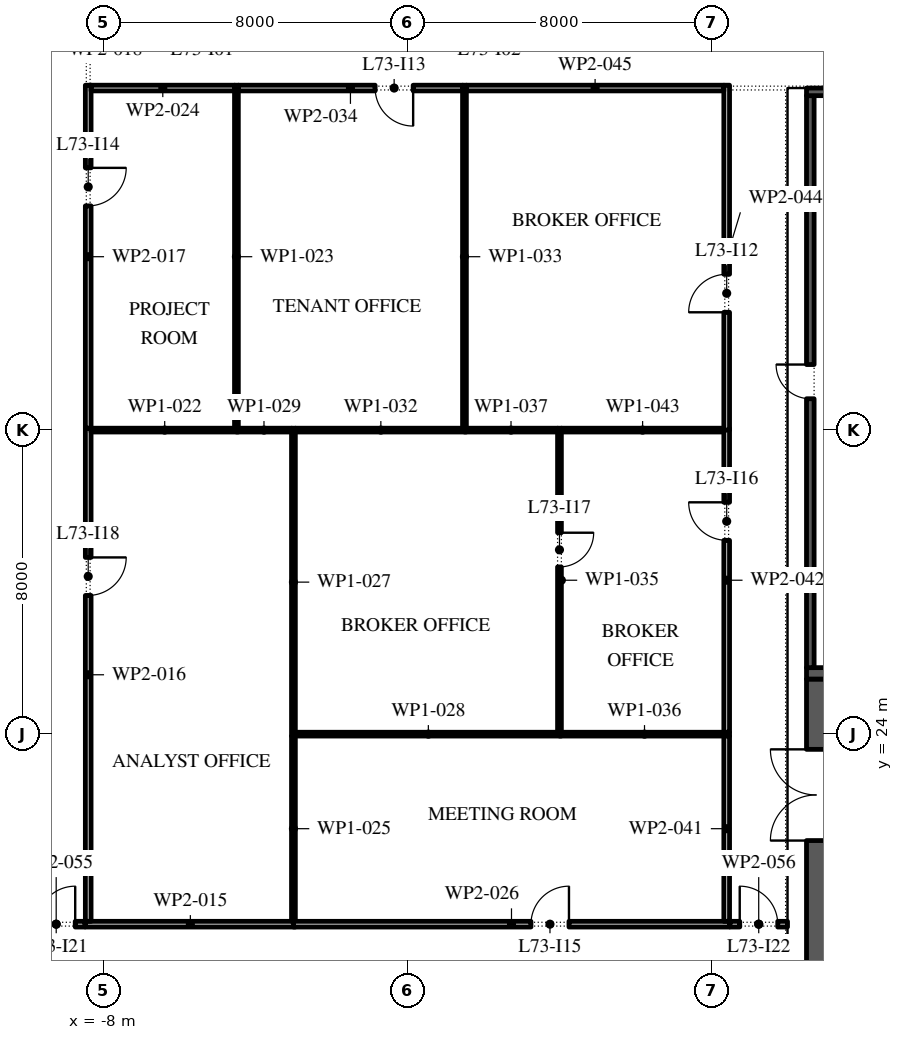
"""IFC4 building model, lengths in metres.
Left out: names, types, materials, properties, quantities, classifications, styles, units other than length and angle.
Written with IfcOpenShell. Run it as: python <this file> out.ifc"""

import sys

from ifc_helpers import new_model, si_unit, direction, frame, frame_2d, origin, place, context, subcontext, project, spatial, rectangle, extrude, element, fill, save


model = new_model("IFC4")
c1 = context("Model", 3, precision=1e-05, world=origin(), true_north=direction((0.0, 1.0)))
c2 = subcontext(c1, "Body", "Model", "MODEL_VIEW")
j1 = project(units=[si_unit("LENGTHUNIT", "METRE"), si_unit("PLANEANGLEUNIT", "RADIAN")], contexts=[c1])
p1 = place(None, origin())
s1 = spatial("IfcSite", under=j1, at=p1, CompositionType="ELEMENT")
p2 = place(p1, origin())
s2 = spatial("IfcBuilding", under=s1, at=p2, CompositionType="ELEMENT")
p3 = place(p2, frame((0.0, 0.0, 334.2)))
s3 = spatial("IfcBuildingStorey", under=s2, at=p3, CompositionType="ELEMENT", Elevation=334.2)
p4 = place(p3, frame((10.75, -2.45, 0.0), z_axis=(0.0, 0.0, 1.0), x_axis=(0.0, 1.0, 0.0)))
e1 = element("IfcWall", 1, at=p4, inside=s3, PredefinedType="SHEAR", context=c2, shape_type="SweptSolid", body=[
    extrude(rectangle(XDim=27.9, YDim=0.5, at=frame_2d((13.95, 0.0))), origin(), (0.0, 0.0, 1.0), 4.0),
])
p5 = place(p4, frame((23.65, 0.0, 0.0)))
e2 = element("IfcOpeningElement", 2, at=p5, cuts=e1, PredefinedType="OPENING", context=c2, shape_type="SweptSolid", body=[
    extrude(rectangle(XDim=2.4, YDim=2.1, at=frame_2d((1.2, 1.05))), frame((0.0, 0.26, 0.0), z_axis=(0.0, -1.0, 0.0), x_axis=(1.0, 0.0, 0.0)), (0.0, 0.0, 1.0), 0.52),
])
p6 = place(p4, frame((1.387, 0.0, 0.0)))
e3 = element("IfcOpeningElement", 3, at=p6, cuts=e1, PredefinedType="OPENING", context=c2, shape_type="SweptSolid", body=[
    extrude(rectangle(XDim=0.9, YDim=2.1, at=frame_2d((0.45, 1.05))), frame((0.0, 0.26, 0.0), z_axis=(0.0, -1.0, 0.0), x_axis=(1.0, 0.0, 0.0)), (0.0, 0.0, 1.0), 0.52),
])
p7 = place(p4, frame((4.562, 0.0, 0.0)))
e4 = element("IfcOpeningElement", 4, at=p7, cuts=e1, PredefinedType="OPENING", context=c2, shape_type="SweptSolid", body=[
    extrude(rectangle(XDim=1.0, YDim=2.1, at=frame_2d((0.5, 1.05))), frame((0.0, 0.26, 0.0), z_axis=(0.0, -1.0, 0.0), x_axis=(1.0, 0.0, 0.0)), (0.0, 0.0, 1.0), 0.52),
])
p8 = place(p3, frame((10.5, 25.6, 0.0), z_axis=(0.0, 0.0, 1.0), x_axis=(1.0, 0.0, 0.0)))
e5 = element("IfcWall", 5, at=p8, inside=s3, PredefinedType="SHEAR", context=c2, shape_type="SweptSolid", body=[
    extrude(rectangle(XDim=11.0, YDim=0.3, at=frame_2d((5.5, 0.0))), origin(), (0.0, 0.0, 1.0), 4.0),
])
p9 = place(p3, frame((10.6, 25.75, 0.0), z_axis=(0.0, 0.0, 1.0), x_axis=(0.0, 1.0, 0.0)))
e6 = element("IfcWall", 6, at=p9, inside=s3, PredefinedType="SHEAR", context=c2, shape_type="SweptSolid", body=[
    extrude(rectangle(XDim=15.05, YDim=0.2, at=frame_2d((7.525, 0.0))), origin(), (0.0, 0.0, 1.0), 4.0),
])
p10 = place(p9, frame((7.075, 0.0, 0.0)))
e7 = element("IfcOpeningElement", 7, at=p10, cuts=e6, PredefinedType="OPENING", context=c2, shape_type="SweptSolid", body=[
    extrude(rectangle(XDim=0.9, YDim=2.1, at=frame_2d((0.45, 1.05))), frame((0.0, 0.11, 0.0), z_axis=(0.0, -1.0, 0.0), x_axis=(1.0, 0.0, 0.0)), (0.0, 0.0, 1.0), 0.22),
])
p11 = place(p3, frame((10.5, 40.9, 0.0), z_axis=(0.0, 0.0, 1.0), x_axis=(1.0, 0.0, 0.0)))
e8 = element("IfcWall", 8, at=p11, inside=s3, PredefinedType="SHEAR", context=c2, shape_type="SweptSolid", body=[
    extrude(rectangle(XDim=11.0, YDim=0.2, at=frame_2d((5.5, 0.0))), origin(), (0.0, 0.0, 1.0), 4.0),
])
p12 = place(p3, frame((-8.475, 19.0, 0.0), z_axis=(0.0, 0.0, 1.0), x_axis=(1.0, 0.0, 0.0)))
e9 = element("IfcWall", 9, at=p12, inside=s3, PredefinedType="PARTITIONING", context=c2, shape_type="SweptSolid", body=[
    extrude(rectangle(XDim=5.525, YDim=0.15, at=frame_2d((2.763, 0.0))), origin(), (0.0, 0.0, 1.0), 4.0),
])
p13 = place(p3, frame((-8.4, 32.05, 0.0), z_axis=(0.0, 0.0, 1.0), x_axis=(0.0, -1.0, 0.0)))
e10 = element("IfcWall", 10, at=p13, inside=s3, PredefinedType="PARTITIONING", context=c2, shape_type="SweptSolid", body=[
    extrude(rectangle(XDim=12.975, YDim=0.15, at=frame_2d((6.488, 0.0))), origin(), (0.0, 0.0, 1.0), 4.0),
])
p14 = place(p13, frame((3.4, 0.0, 0.0)))
e11 = element("IfcOpeningElement", 11, at=p14, cuts=e10, PredefinedType="OPENING", context=c2, shape_type="SweptSolid", body=[
    extrude(rectangle(XDim=1.0, YDim=2.1, at=frame_2d((0.5, 1.05))), frame((0.0, 0.085, 0.0), z_axis=(0.0, -1.0, 0.0), x_axis=(1.0, 0.0, 0.0)), (0.0, 0.0, 1.0), 0.17),
])
p15 = place(p3, frame((-8.4, 41.075, 0.0), z_axis=(0.0, 0.0, 1.0), x_axis=(0.0, -1.0, 0.0)))
e12 = element("IfcWall", 12, at=p15, inside=s3, PredefinedType="PARTITIONING", context=c2, shape_type="SweptSolid", body=[
    extrude(rectangle(XDim=9.025, YDim=0.15, at=frame_2d((4.512, 0.0))), origin(), (0.0, 0.0, 1.0), 4.0),
])
p16 = place(p15, frame((2.175, 0.0, 0.0)))
e13 = element("IfcOpeningElement", 13, at=p16, cuts=e12, PredefinedType="OPENING", context=c2, shape_type="SweptSolid", body=[
    extrude(rectangle(XDim=1.0, YDim=2.1, at=frame_2d((0.5, 1.05))), frame((0.0, 0.085, 0.0), z_axis=(0.0, -1.0, 0.0), x_axis=(1.0, 0.0, 0.0)), (0.0, 0.0, 1.0), 0.17),
])
p17 = place(p3, frame((-4.45, 32.0, 0.0), z_axis=(0.0, 0.0, 1.0), x_axis=(-1.0, 0.0, 0.0)))
e14 = element("IfcWall", 14, at=p17, inside=s3, PredefinedType="PARTITIONING", context=c2, shape_type="SweptSolid", body=[
    extrude(rectangle(XDim=3.875, YDim=0.1, at=frame_2d((1.938, 0.0))), origin(), (0.0, 0.0, 1.0), 4.0),
])
p18 = place(p3, frame((-4.5, 32.05, 0.0), z_axis=(0.0, 0.0, 1.0), x_axis=(0.0, 1.0, 0.0)))
e15 = element("IfcWall", 15, at=p18, inside=s3, PredefinedType="PARTITIONING", context=c2, shape_type="SweptSolid", body=[
    extrude(rectangle(XDim=9.025, YDim=0.1, at=frame_2d((4.512, 0.0))), origin(), (0.0, 0.0, 1.0), 4.0),
])
p19 = place(p3, frame((-4.55, 41.0, 0.0), z_axis=(0.0, 0.0, 1.0), x_axis=(-1.0, 0.0, 0.0)))
e16 = element("IfcWall", 16, at=p19, inside=s3, PredefinedType="PARTITIONING", context=c2, shape_type="SweptSolid", body=[
    extrude(rectangle(XDim=3.775, YDim=0.15, at=frame_2d((1.887, 0.0))), origin(), (0.0, 0.0, 1.0), 4.0),
])
p20 = place(p3, frame((-3.0, 19.075, 0.0), z_axis=(0.0, 0.0, 1.0), x_axis=(0.0, 1.0, 0.0)))
e17 = element("IfcWall", 17, at=p20, inside=s3, PredefinedType="PARTITIONING", context=c2, shape_type="SweptSolid", body=[
    extrude(rectangle(XDim=4.875, YDim=0.1, at=frame_2d((2.438, 0.0))), origin(), (0.0, 0.0, 1.0), 4.0),
])
p21 = place(p3, frame((-3.0, 19.0, 0.0), z_axis=(0.0, 0.0, 1.0), x_axis=(1.0, 0.0, 0.0)))
e18 = element("IfcWall", 18, at=p21, inside=s3, PredefinedType="PARTITIONING", context=c2, shape_type="SweptSolid", body=[
    extrude(rectangle(XDim=11.475, YDim=0.15, at=frame_2d((5.738, 0.0))), origin(), (0.0, 0.0, 1.0), 4.0),
])
p22 = place(p21, frame((6.25, 0.0, 0.0)))
e19 = element("IfcOpeningElement", 19, at=p22, cuts=e18, PredefinedType="OPENING", context=c2, shape_type="SweptSolid", body=[
    extrude(rectangle(XDim=1.0, YDim=2.1, at=frame_2d((0.5, 1.05))), frame((0.0, 0.085, 0.0), z_axis=(0.0, -1.0, 0.0), x_axis=(1.0, 0.0, 0.0)), (0.0, 0.0, 1.0), 0.17),
])
p23 = place(p3, frame((-3.0, 23.95, 0.0), z_axis=(0.0, 0.0, 1.0), x_axis=(0.0, 1.0, 0.0)))
e20 = element("IfcWall", 20, at=p23, inside=s3, PredefinedType="PARTITIONING", context=c2, shape_type="SweptSolid", body=[
    extrude(rectangle(XDim=8.1, YDim=0.1, at=frame_2d((4.05, 0.0))), origin(), (0.0, 0.0, 1.0), 4.0),
])
p24 = place(p3, frame((-2.95, 24.0, 0.0), z_axis=(0.0, 0.0, 1.0), x_axis=(1.0, 0.0, 0.0)))
e21 = element("IfcWall", 21, at=p24, inside=s3, PredefinedType="PARTITIONING", context=c2, shape_type="SweptSolid", body=[
    extrude(rectangle(XDim=7.0, YDim=0.1, at=frame_2d((3.5, 0.0))), origin(), (0.0, 0.0, 1.0), 4.0),
])
p25 = place(p3, frame((-3.05, 32.0, 0.0), z_axis=(0.0, 0.0, 1.0), x_axis=(-1.0, 0.0, 0.0)))
e22 = element("IfcWall", 22, at=p25, inside=s3, PredefinedType="PARTITIONING", context=c2, shape_type="SweptSolid", body=[
    extrude(rectangle(XDim=1.45, YDim=0.1, at=frame_2d((0.725, 0.0))), origin(), (0.0, 0.0, 1.0), 4.0),
])
p26 = place(p3, frame((1.55, 32.0, 0.0), z_axis=(0.0, 0.0, 1.0), x_axis=(-1.0, 0.0, 0.0)))
e23 = element("IfcWall", 23, at=p26, inside=s3, PredefinedType="PARTITIONING", context=c2, shape_type="SweptSolid", body=[
    extrude(rectangle(XDim=4.5, YDim=0.1, at=frame_2d((2.25, 0.0))), origin(), (0.0, 0.0, 1.0), 4.0),
])
p27 = place(p3, frame((1.5, 32.05, 0.0), z_axis=(0.0, 0.0, 1.0), x_axis=(0.0, 1.0, 0.0)))
e24 = element("IfcWall", 24, at=p27, inside=s3, PredefinedType="PARTITIONING", context=c2, shape_type="SweptSolid", body=[
    extrude(rectangle(XDim=9.025, YDim=0.1, at=frame_2d((4.512, 0.0))), origin(), (0.0, 0.0, 1.0), 4.0),
])
p28 = place(p3, frame((1.45, 41.0, 0.0), z_axis=(0.0, 0.0, 1.0), x_axis=(-1.0, 0.0, 0.0)))
e25 = element("IfcWall", 25, at=p28, inside=s3, PredefinedType="PARTITIONING", context=c2, shape_type="SweptSolid", body=[
    extrude(rectangle(XDim=5.9, YDim=0.15, at=frame_2d((2.95, 0.0))), origin(), (0.0, 0.0, 1.0), 4.0),
])
p29 = place(p28, frame((1.3, 0.0, 0.0)))
e26 = element("IfcOpeningElement", 26, at=p29, cuts=e25, PredefinedType="OPENING", context=c2, shape_type="SweptSolid", body=[
    extrude(rectangle(XDim=1.0, YDim=2.1, at=frame_2d((0.5, 1.05))), frame((0.0, 0.085, 0.0), z_axis=(0.0, -1.0, 0.0), x_axis=(1.0, 0.0, 0.0)), (0.0, 0.0, 1.0), 0.17),
])
p30 = place(p3, frame((4.0, 24.05, 0.0), z_axis=(0.0, 0.0, 1.0), x_axis=(0.0, 1.0, 0.0)))
e27 = element("IfcWall", 27, at=p30, inside=s3, PredefinedType="PARTITIONING", context=c2, shape_type="SweptSolid", body=[
    extrude(rectangle(XDim=8.0, YDim=0.1, at=frame_2d((4.0, 0.0))), origin(), (0.0, 0.0, 1.0), 4.0),
])
p31 = place(p30, frame((4.35, 0.0, 0.0)))
e28 = element("IfcOpeningElement", 28, at=p31, cuts=e27, PredefinedType="OPENING", context=c2, shape_type="SweptSolid", body=[
    extrude(rectangle(XDim=0.9, YDim=2.1, at=frame_2d((0.45, 1.05))), frame((0.0, 0.06, 0.0), z_axis=(0.0, -1.0, 0.0), x_axis=(1.0, 0.0, 0.0)), (0.0, 0.0, 1.0), 0.12),
])
p32 = place(p3, frame((4.0, 24.0, 0.0), z_axis=(0.0, 0.0, 1.0), x_axis=(1.0, 0.0, 0.0)))
e29 = element("IfcWall", 29, at=p32, inside=s3, PredefinedType="PARTITIONING", context=c2, shape_type="SweptSolid", body=[
    extrude(rectangle(XDim=4.475, YDim=0.1, at=frame_2d((2.238, 0.0))), origin(), (0.0, 0.0, 1.0), 4.0),
])
p33 = place(p3, frame((3.95, 32.0, 0.0), z_axis=(0.0, 0.0, 1.0), x_axis=(-1.0, 0.0, 0.0)))
e30 = element("IfcWall", 30, at=p33, inside=s3, PredefinedType="PARTITIONING", context=c2, shape_type="SweptSolid", body=[
    extrude(rectangle(XDim=2.45, YDim=0.1, at=frame_2d((1.225, 0.0))), origin(), (0.0, 0.0, 1.0), 4.0),
])
p34 = place(p3, frame((8.4, 19.075, 0.0), z_axis=(0.0, 0.0, 1.0), x_axis=(0.0, 1.0, 0.0)))
e31 = element("IfcWall", 31, at=p34, inside=s3, PredefinedType="PARTITIONING", context=c2, shape_type="SweptSolid", body=[
    extrude(rectangle(XDim=4.875, YDim=0.15, at=frame_2d((2.438, 0.0))), origin(), (0.0, 0.0, 1.0), 4.0),
])
p35 = place(p3, frame((8.4, 24.05, 0.0), z_axis=(0.0, 0.0, 1.0), x_axis=(0.0, 1.0, 0.0)))
e32 = element("IfcWall", 32, at=p35, inside=s3, PredefinedType="PARTITIONING", context=c2, shape_type="SweptSolid", body=[
    extrude(rectangle(XDim=8.0, YDim=0.15, at=frame_2d((4.0, 0.0))), origin(), (0.0, 0.0, 1.0), 4.0),
])
p36 = place(p35, frame((5.05, 0.0, 0.0)))
e33 = element("IfcOpeningElement", 33, at=p36, cuts=e32, PredefinedType="OPENING", context=c2, shape_type="SweptSolid", body=[
    extrude(rectangle(XDim=1.0, YDim=2.1, at=frame_2d((0.5, 1.05))), frame((0.0, 0.085, 0.0), z_axis=(0.0, -1.0, 0.0), x_axis=(1.0, 0.0, 0.0)), (0.0, 0.0, 1.0), 0.17),
])
p37 = place(p3, frame((8.325, 32.0, 0.0), z_axis=(0.0, 0.0, 1.0), x_axis=(-1.0, 0.0, 0.0)))
e34 = element("IfcWall", 34, at=p37, inside=s3, PredefinedType="PARTITIONING", context=c2, shape_type="SweptSolid", body=[
    extrude(rectangle(XDim=4.275, YDim=0.1, at=frame_2d((2.137, 0.0))), origin(), (0.0, 0.0, 1.0), 4.0),
])
p38 = place(p3, frame((8.4, 32.0, 0.0), z_axis=(0.0, 0.0, 1.0), x_axis=(0.0, 1.0, 0.0)))
e35 = element("IfcWall", 35, at=p38, inside=s3, PredefinedType="PARTITIONING", context=c2, shape_type="SweptSolid", body=[
    extrude(rectangle(XDim=9.075, YDim=0.15, at=frame_2d((4.538, 0.0))), origin(), (0.0, 0.0, 1.0), 4.0),
])
p39 = place(p38, frame((3.1, 0.0, 0.0)))
e36 = element("IfcOpeningElement", 36, at=p39, cuts=e35, PredefinedType="OPENING", context=c2, shape_type="SweptSolid", body=[
    extrude(rectangle(XDim=1.0, YDim=2.1, at=frame_2d((0.5, 1.05))), frame((0.0, 0.085, 0.0), z_axis=(0.0, -1.0, 0.0), x_axis=(1.0, 0.0, 0.0)), (0.0, 0.0, 1.0), 0.17),
])
p40 = place(p3, frame((8.325, 41.0, 0.0), z_axis=(0.0, 0.0, 1.0), x_axis=(-1.0, 0.0, 0.0)))
e37 = element("IfcWall", 37, at=p40, inside=s3, PredefinedType="PARTITIONING", context=c2, shape_type="SweptSolid", body=[
    extrude(rectangle(XDim=6.775, YDim=0.15, at=frame_2d((3.387, 0.0))), origin(), (0.0, 0.0, 1.0), 4.0),
])
p41 = place(p3, frame((-10.0, 19.0, 0.0), z_axis=(0.0, 0.0, 1.0), x_axis=(1.0, 0.0, 0.0)))
e38 = element("IfcWall", 38, at=p41, inside=s3, PredefinedType="PARTITIONING", context=c2, shape_type="SweptSolid", body=[
    extrude(rectangle(XDim=1.515, YDim=0.15, at=frame_2d((0.757, 0.0))), origin(), (0.0, 0.0, 1.0), 4.0),
])
p42 = place(p41, frame((0.258, 0.0, 0.0)))
e39 = element("IfcOpeningElement", 39, at=p42, cuts=e38, PredefinedType="OPENING", context=c2, shape_type="SweptSolid", body=[
    extrude(rectangle(XDim=1.0, YDim=2.1, at=frame_2d((0.5, 1.05))), frame((0.0, 0.085, 0.0), z_axis=(0.0, -1.0, 0.0), x_axis=(1.0, 0.0, 0.0)), (0.0, 0.0, 1.0), 0.17),
])
p43 = place(p3, frame((8.485, 19.0, 0.0), z_axis=(0.0, 0.0, 1.0), x_axis=(1.0, 0.0, 0.0)))
e40 = element("IfcWall", 40, at=p43, inside=s3, PredefinedType="PARTITIONING", context=c2, shape_type="SweptSolid", body=[
    extrude(rectangle(XDim=1.515, YDim=0.15, at=frame_2d((0.757, 0.0))), origin(), (0.0, 0.0, 1.0), 4.0),
])
p44 = place(p43, frame((0.258, 0.0, 0.0)))
e41 = element("IfcOpeningElement", 41, at=p44, cuts=e40, PredefinedType="OPENING", context=c2, shape_type="SweptSolid", body=[
    extrude(rectangle(XDim=1.0, YDim=2.1, at=frame_2d((0.5, 1.05))), frame((0.0, 0.085, 0.0), z_axis=(0.0, -1.0, 0.0), x_axis=(1.0, 0.0, 0.0)), (0.0, 0.0, 1.0), 0.17),
])
p45 = place(p5, origin())
e42 = element("IfcDoor", 42, at=p45, inside=s3, OperationType="DOUBLE_DOOR_SINGLE_SWING", PredefinedType="DOOR", context=c2, shape_type="SweptSolid", body=[
    extrude(rectangle(XDim=2.4, YDim=2.1, at=frame_2d((1.2, 1.05))), frame((0.0, 0.025, 0.0), z_axis=(0.0, -1.0, 0.0), x_axis=(1.0, 0.0, 0.0)), (0.0, 0.0, 1.0), 0.05),
])
fill(e2, e42)
p46 = place(p10, origin())
e43 = element("IfcDoor", 43, at=p46, inside=s3, OperationType="SINGLE_SWING_LEFT", PredefinedType="DOOR", context=c2, shape_type="SweptSolid", body=[
    extrude(rectangle(XDim=0.9, YDim=2.1, at=frame_2d((0.45, 1.05))), frame((0.0, -0.05, 0.0), z_axis=(0.0, -1.0, 0.0), x_axis=(1.0, 0.0, 0.0)), (0.0, 0.0, 1.0), 0.05),
])
fill(e7, e43)
p47 = place(p39, origin())
e44 = element("IfcDoor", 44, at=p47, inside=s3, OperationType="SINGLE_SWING_RIGHT", PredefinedType="DOOR", context=c2, shape_type="SweptSolid", body=[
    extrude(rectangle(XDim=1.0, YDim=2.1, at=frame_2d((0.5, 1.05))), frame((0.0, 0.025, 0.0), z_axis=(0.0, -1.0, 0.0), x_axis=(1.0, 0.0, 0.0)), (0.0, 0.0, 1.0), 0.05),
])
fill(e36, e44)
p48 = place(p29, origin())
e45 = element("IfcDoor", 45, at=p48, inside=s3, OperationType="SINGLE_SWING_RIGHT", PredefinedType="DOOR", context=c2, shape_type="SweptSolid", body=[
    extrude(rectangle(XDim=1.0, YDim=2.1, at=frame_2d((0.5, 1.05))), frame((0.0, 0.025, 0.0), z_axis=(0.0, -1.0, 0.0), x_axis=(1.0, 0.0, 0.0)), (0.0, 0.0, 1.0), 0.05),
])
fill(e26, e45)
p49 = place(p16, origin())
e46 = element("IfcDoor", 46, at=p49, inside=s3, OperationType="SINGLE_SWING_RIGHT", PredefinedType="DOOR", context=c2, shape_type="SweptSolid", body=[
    extrude(rectangle(XDim=1.0, YDim=2.1, at=frame_2d((0.5, 1.05))), frame((0.0, 0.025, 0.0), z_axis=(0.0, -1.0, 0.0), x_axis=(1.0, 0.0, 0.0)), (0.0, 0.0, 1.0), 0.05),
])
fill(e13, e46)
p50 = place(p22, origin())
e47 = element("IfcDoor", 47, at=p50, inside=s3, OperationType="SINGLE_SWING_LEFT", PredefinedType="DOOR", context=c2, shape_type="SweptSolid", body=[
    extrude(rectangle(XDim=1.0, YDim=2.1, at=frame_2d((0.5, 1.05))), frame((0.0, 0.025, 0.0), z_axis=(0.0, -1.0, 0.0), x_axis=(1.0, 0.0, 0.0)), (0.0, 0.0, 1.0), 0.05),
])
fill(e19, e47)
p51 = place(p36, origin())
e48 = element("IfcDoor", 48, at=p51, inside=s3, OperationType="SINGLE_SWING_LEFT", PredefinedType="DOOR", context=c2, shape_type="SweptSolid", body=[
    extrude(rectangle(XDim=1.0, YDim=2.1, at=frame_2d((0.5, 1.05))), frame((0.0, 0.025, 0.0), z_axis=(0.0, -1.0, 0.0), x_axis=(1.0, 0.0, 0.0)), (0.0, 0.0, 1.0), 0.05),
])
fill(e33, e48)
p52 = place(p31, frame((0.9, 0.0, 0.0), z_axis=(0.0, 0.0, 1.0), x_axis=(-1.0, 0.0, 0.0)))
e49 = element("IfcDoor", 49, at=p52, inside=s3, OperationType="SINGLE_SWING_RIGHT", PredefinedType="DOOR", context=c2, shape_type="SweptSolid", body=[
    extrude(rectangle(XDim=0.9, YDim=2.1, at=frame_2d((0.45, 1.05))), frame((0.0, 0.025, 0.0), z_axis=(0.0, -1.0, 0.0), x_axis=(1.0, 0.0, 0.0)), (0.0, 0.0, 1.0), 0.05),
])
fill(e28, e49)
p53 = place(p14, origin())
e50 = element("IfcDoor", 50, at=p53, inside=s3, OperationType="SINGLE_SWING_RIGHT", PredefinedType="DOOR", context=c2, shape_type="SweptSolid", body=[
    extrude(rectangle(XDim=1.0, YDim=2.1, at=frame_2d((0.5, 1.05))), frame((0.0, 0.025, 0.0), z_axis=(0.0, -1.0, 0.0), x_axis=(1.0, 0.0, 0.0)), (0.0, 0.0, 1.0), 0.05),
])
fill(e11, e50)
p54 = place(p42, origin())
e51 = element("IfcDoor", 51, at=p54, inside=s3, OperationType="SINGLE_SWING_LEFT", PredefinedType="DOOR", context=c2, shape_type="SweptSolid", body=[
    extrude(rectangle(XDim=1.0, YDim=2.1, at=frame_2d((0.5, 1.05))), frame((0.0, 0.025, 0.0), z_axis=(0.0, -1.0, 0.0), x_axis=(1.0, 0.0, 0.0)), (0.0, 0.0, 1.0), 0.05),
])
fill(e39, e51)
p55 = place(p44, origin())
e52 = element("IfcDoor", 52, at=p55, inside=s3, OperationType="SINGLE_SWING_RIGHT", PredefinedType="DOOR", context=c2, shape_type="SweptSolid", body=[
    extrude(rectangle(XDim=1.0, YDim=2.1, at=frame_2d((0.5, 1.05))), frame((0.0, 0.025, 0.0), z_axis=(0.0, -1.0, 0.0), x_axis=(1.0, 0.0, 0.0)), (0.0, 0.0, 1.0), 0.05),
])
fill(e41, e52)
save(model, sys.argv[1])
